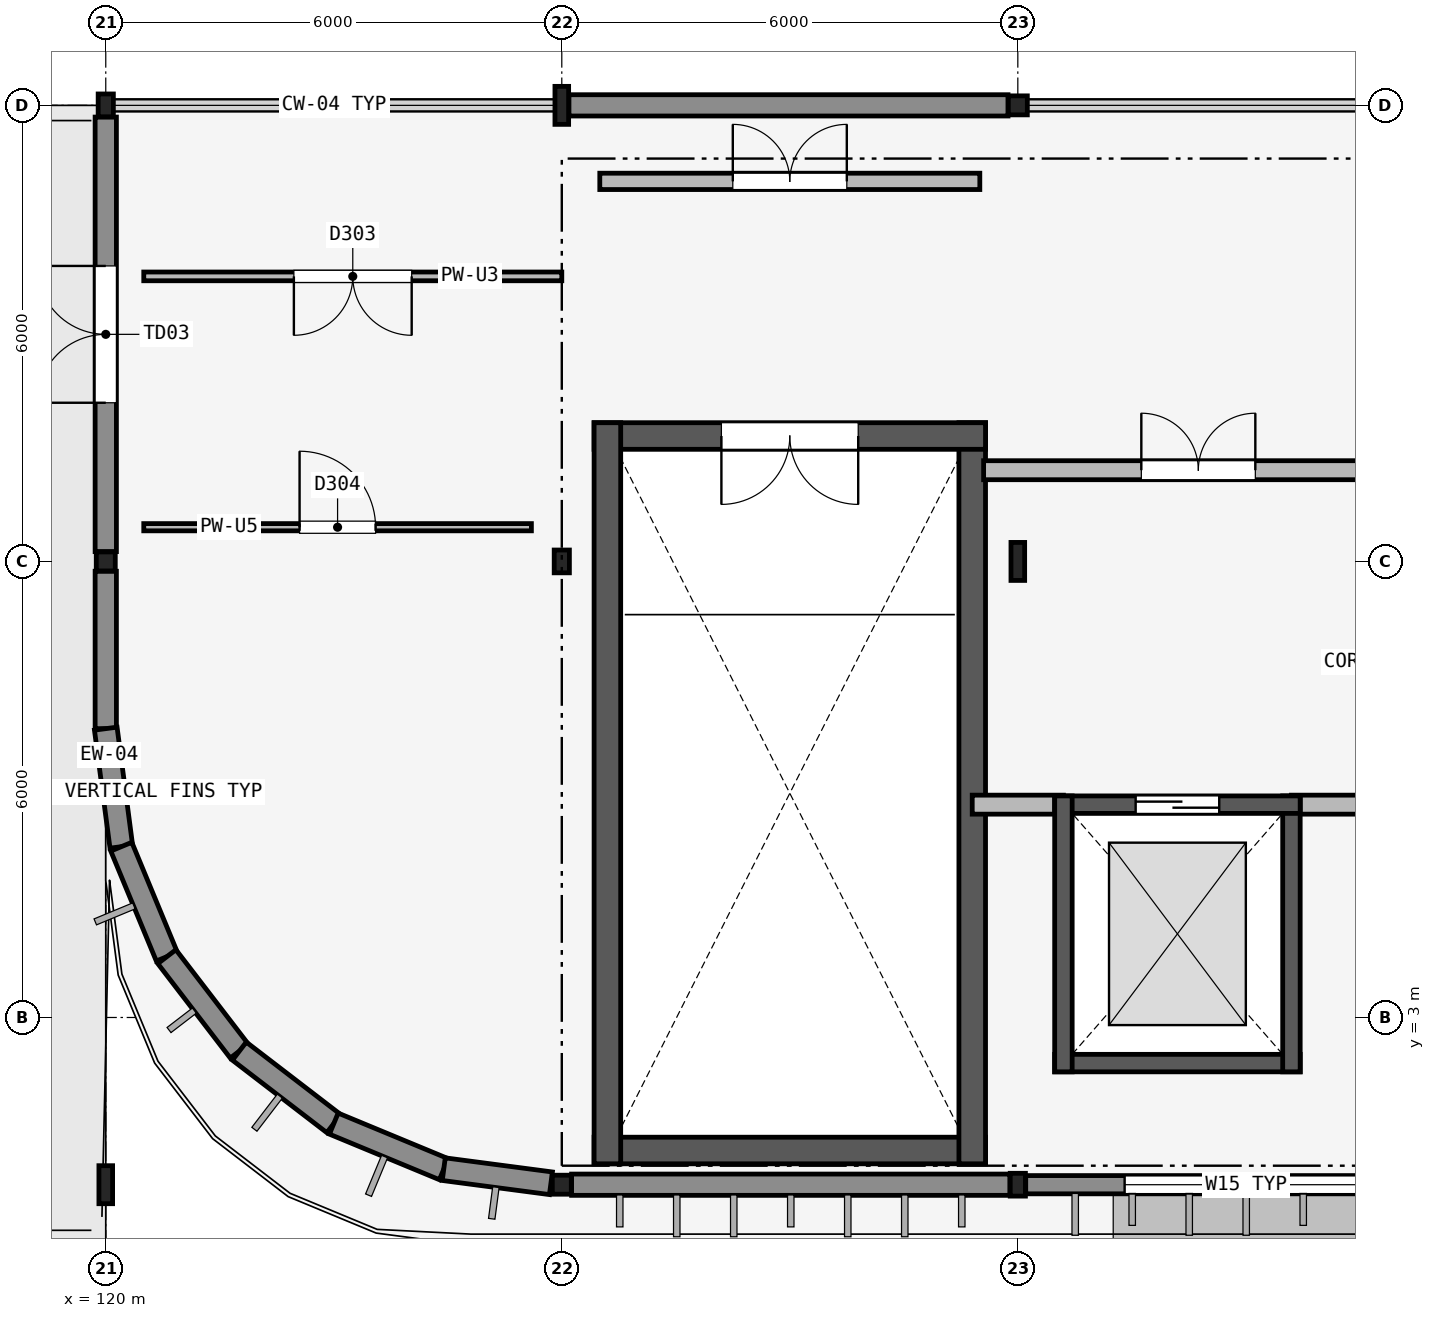
"""IFC4 building model, lengths in metres.
Left out: names, types, materials, properties, quantities, classifications, styles, units other than length and angle.
Written with IfcOpenShell. Run it as: python <this file> out.ifc"""

import sys

from ifc_helpers import new_model, si_unit, direction, frame, frame_2d, origin, origin_2d, place, context, subcontext, project, spatial, rectangle, hollow_rectangle, i_section, extrude, element, fill, save


model = new_model("IFC4")
c1 = context("Model", 3, precision=1e-05, world=origin(), true_north=direction((0.0, 1.0)))
c2 = subcontext(c1, "Body", "Model", "MODEL_VIEW")
j1 = project(units=[si_unit("LENGTHUNIT", "METRE"), si_unit("PLANEANGLEUNIT", "RADIAN")], contexts=[c1])
p1 = place(None, origin())
s1 = spatial("IfcSite", under=j1, at=p1, CompositionType="ELEMENT")
p2 = place(p1, origin())
s2 = spatial("IfcBuilding", under=s1, at=p2, CompositionType="ELEMENT")
p3 = place(p2, frame((0.0, 0.0, 30.0)))
s3 = spatial("IfcBuildingStorey", under=s2, at=p3, CompositionType="ELEMENT", Elevation=30.0)
p4 = place(p3, frame((120.0, 0.8, 0.0), z_axis=(0.0, 0.0, 1.0), x_axis=(1.0, 0.0, 0.0)))
e1 = element("IfcColumn", 1, at=p4, inside=s3, PredefinedType="COLUMN", context=c2, shape_type="SweptSolid", body=[
    extrude(i_section(OverallWidth=0.18, OverallDepth=0.5, WebThickness=0.01, FlangeThickness=0.017, FilletRadius=0.017, at=origin_2d()), origin(), (0.0, 0.0, 1.0), 4.2),
])
p5 = place(p3, frame((120.0, 9.0, 0.0), z_axis=(0.0, 0.0, 1.0), x_axis=(1.0, 0.0, 0.0)))
e2 = element("IfcColumn", 2, at=p5, inside=s3, PredefinedType="COLUMN", context=c2, shape_type="SweptSolid", body=[
    extrude(hollow_rectangle(XDim=0.25, YDim=0.25, WallThickness=0.012, InnerFilletRadius=0.012, OuterFilletRadius=0.024, at=origin_2d()), origin(), (0.0, 0.0, 1.0), 4.2),
])
p6 = place(p3, frame((120.0, 15.0, 0.0), z_axis=(0.0, 0.0, 1.0), x_axis=(1.0, 0.0, 0.0)))
e3 = element("IfcColumn", 3, at=p6, inside=s3, PredefinedType="COLUMN", context=c2, shape_type="SweptSolid", body=[
    extrude(hollow_rectangle(XDim=0.2, YDim=0.3, WallThickness=0.012, InnerFilletRadius=0.012, OuterFilletRadius=0.024, at=origin_2d()), origin(), (0.0, 0.0, 1.0), 4.2),
])
p7 = place(p3, frame((126.0, 0.8, 0.0), z_axis=(0.0, 0.0, 1.0), x_axis=(1.0, 0.0, 0.0)))
e4 = element("IfcColumn", 4, at=p7, inside=s3, PredefinedType="COLUMN", context=c2, shape_type="SweptSolid", body=[
    extrude(hollow_rectangle(XDim=0.25, YDim=0.25, WallThickness=0.012, InnerFilletRadius=0.012, OuterFilletRadius=0.024, at=origin_2d()), origin(), (0.0, 0.0, 1.0), 4.2),
])
p8 = place(p3, frame((126.0, 9.0, 0.0), z_axis=(0.0, 0.0, 1.0), x_axis=(1.0, 0.0, 0.0)))
e5 = element("IfcColumn", 5, at=p8, inside=s3, PredefinedType="COLUMN", context=c2, shape_type="SweptSolid", body=[
    extrude(hollow_rectangle(XDim=0.2, YDim=0.3, WallThickness=0.012, InnerFilletRadius=0.012, OuterFilletRadius=0.024, at=origin_2d()), origin(), (0.0, 0.0, 1.0), 4.2),
])
p9 = place(p3, frame((126.0, 15.0, 0.0), z_axis=(0.0, 0.0, 1.0), x_axis=(1.0, 0.0, 0.0)))
e6 = element("IfcColumn", 6, at=p9, inside=s3, PredefinedType="COLUMN", context=c2, shape_type="SweptSolid", body=[
    extrude(i_section(OverallWidth=0.18, OverallDepth=0.5, WebThickness=0.01, FlangeThickness=0.017, FilletRadius=0.017, at=origin_2d()), origin(), (0.0, 0.0, 1.0), 4.2),
])
p10 = place(p3, frame((132.0, 0.8, 0.0), z_axis=(0.0, 0.0, 1.0), x_axis=(1.0, 0.0, 0.0)))
e7 = element("IfcColumn", 7, at=p10, inside=s3, PredefinedType="COLUMN", context=c2, shape_type="SweptSolid", body=[
    extrude(hollow_rectangle(XDim=0.2, YDim=0.3, WallThickness=0.012, InnerFilletRadius=0.012, OuterFilletRadius=0.024, at=origin_2d()), origin(), (0.0, 0.0, 1.0), 4.2),
])
p11 = place(p3, frame((132.0, 9.0, 0.0), z_axis=(0.0, 0.0, 1.0), x_axis=(1.0, 0.0, 0.0)))
e8 = element("IfcColumn", 8, at=p11, inside=s3, PredefinedType="COLUMN", context=c2, shape_type="SweptSolid", body=[
    extrude(i_section(OverallWidth=0.18, OverallDepth=0.5, WebThickness=0.01, FlangeThickness=0.017, FilletRadius=0.017, at=origin_2d()), origin(), (0.0, 0.0, 1.0), 4.2),
])
p12 = place(p3, frame((132.0, 15.0, 0.0), z_axis=(0.0, 0.0, 1.0), x_axis=(1.0, 0.0, 0.0)))
e9 = element("IfcColumn", 9, at=p12, inside=s3, PredefinedType="COLUMN", context=c2, shape_type="SweptSolid", body=[
    extrude(hollow_rectangle(XDim=0.25, YDim=0.25, WallThickness=0.012, InnerFilletRadius=0.012, OuterFilletRadius=0.024, at=origin_2d()), origin(), (0.0, 0.0, 1.0), 4.2),
])
p13 = place(p3, frame((126.129, 0.8, 0.0), z_axis=(0.0, 0.0, 1.0), x_axis=(1.0, 0.0, 0.0)))
e10 = element("IfcWall", 10, at=p13, inside=s3, PredefinedType="SOLIDWALL", context=c2, shape_type="SweptSolid", body=[
    extrude(rectangle(XDim=5.767, YDim=0.28, at=frame_2d((2.884, 0.0))), origin(), (0.0, 0.0, 1.0), 3.624),
])
p14 = place(p3, frame((132.104, 0.8, 0.0), z_axis=(0.0, 0.0, 1.0), x_axis=(1.0, 0.0, 0.0)))
e11 = element("IfcWall", 11, at=p14, inside=s3, PredefinedType="SOLIDWALL", context=c2, shape_type="SweptSolid", body=[
    extrude(rectangle(XDim=5.802, YDim=0.24, at=frame_2d((2.901, 0.0))), origin(), (0.0, 0.0, 1.0), 3.624),
])
p15 = place(p14, frame((1.301, 0.0, 0.8)))
e12 = element("IfcOpeningElement", 12, at=p15, cuts=e11, PredefinedType="OPENING", context=c2, shape_type="SweptSolid", body=[
    extrude(rectangle(XDim=3.2, YDim=1.8, at=frame_2d((1.6, 0.9))), frame((0.0, 0.13, 0.0), z_axis=(0.0, -1.0, 0.0), x_axis=(1.0, 0.0, 0.0)), (0.0, 0.0, 1.0), 0.26),
])
p16 = place(p3, frame((126.094, 15.0, 0.0), z_axis=(0.0, 0.0, 1.0), x_axis=(1.0, 0.0, 0.0)))
e13 = element("IfcWall", 13, at=p16, inside=s3, PredefinedType="SOLIDWALL", context=c2, shape_type="SweptSolid", body=[
    extrude(rectangle(XDim=5.777, YDim=0.28, at=frame_2d((2.889, 0.0))), origin(), (0.0, 0.0, 1.0), 3.43),
])
p17 = place(p3, frame((120.0, 6.8, 0.0), z_axis=(0.0, 0.0, 1.0), x_axis=(0.0, 1.0, 0.0)))
e14 = element("IfcWall", 14, at=p17, inside=s3, PredefinedType="SOLIDWALL", context=c2, shape_type="SweptSolid", body=[
    extrude(rectangle(XDim=2.071, YDim=0.28, at=frame_2d((1.036, 0.0))), origin(), (0.0, 0.0, 1.0), 3.58),
])
p18 = place(p3, frame((120.0, 9.129, 0.0), z_axis=(0.0, 0.0, 1.0), x_axis=(0.0, 1.0, 0.0)))
e15 = element("IfcWall", 15, at=p18, inside=s3, PredefinedType="SOLIDWALL", context=c2, shape_type="SweptSolid", body=[
    extrude(rectangle(XDim=5.717, YDim=0.28, at=frame_2d((2.858, 0.0))), origin(), (0.0, 0.0, 1.0), 3.58),
])
p19 = place(p18, frame((1.958, 0.0, 0.0)))
e16 = element("IfcOpeningElement", 16, at=p19, cuts=e15, PredefinedType="OPENING", context=c2, shape_type="SweptSolid", body=[
    extrude(rectangle(XDim=1.8, YDim=2.3, at=frame_2d((0.9, 1.15))), frame((0.0, 0.15, 0.0), z_axis=(0.0, -1.0, 0.0), x_axis=(1.0, 0.0, 0.0)), (0.0, 0.0, 1.0), 0.3),
])
p20 = place(p3, frame((120.0, 6.8, 0.0), z_axis=(0.0, 0.0, 1.0), x_axis=(0.130458544462, -0.991453765022, 0.0)))
e17 = element("IfcWall", 17, at=p20, inside=s3, PredefinedType="SOLIDWALL", context=c2, shape_type="SweptSolid", body=[
    extrude(rectangle(XDim=1.566, YDim=0.3, at=frame_2d((0.783, 0.0))), origin(), (0.0, 0.0, 1.0), 3.624),
])
p21 = place(p3, frame((120.204, 5.247, 0.0), z_axis=(0.0, 0.0, 1.0), x_axis=(0.382677606907, -0.923881945474, 0.0)))
e18 = element("IfcWall", 18, at=p21, inside=s3, PredefinedType="SOLIDWALL", context=c2, shape_type="SweptSolid", body=[
    extrude(rectangle(XDim=1.566, YDim=0.3, at=frame_2d((0.783, 0.0))), origin(), (0.0, 0.0, 1.0), 3.624),
])
for number, where, z_axis, x_axis in (
    (19, (120.804, 3.8, 0.0), (0.0, 0.0, 1.0), (0.609, -0.793, 0.0)),
    (20, (121.757, 2.557, 0.0), (0.0, 0.0, 1.0), (0.793, -0.609, 0.0)),
):
    element("IfcWall", number, at=place(p3, frame(where, z_axis=z_axis, x_axis=x_axis)), inside=s3, PredefinedType="SOLIDWALL", context=c2, shape_type="SweptSolid", body=[
        extrude(rectangle(XDim=1.566, YDim=0.3, at=frame_2d((0.783, 0.0))), origin(), (0.0, 0.0, 1.0), 4.035),
    ])
p22 = place(p3, frame((123.0, 1.604, 0.0), z_axis=(0.0, 0.0, 1.0), x_axis=(0.923881945474, -0.382677606907, 0.0)))
e21 = element("IfcWall", 21, at=p22, inside=s3, PredefinedType="SOLIDWALL", context=c2, shape_type="SweptSolid", body=[
    extrude(rectangle(XDim=1.566, YDim=0.3, at=frame_2d((0.783, 0.0))), origin(), (0.0, 0.0, 1.0), 3.73),
])
p23 = place(p3, frame((124.447, 1.004, 0.0), z_axis=(0.0, 0.0, 1.0), x_axis=(0.99145137358, -0.130476717562, 0.0)))
e22 = element("IfcWall", 22, at=p23, inside=s3, PredefinedType="SOLIDWALL", context=c2, shape_type="SweptSolid", body=[
    extrude(rectangle(XDim=1.422, YDim=0.3, at=frame_2d((0.711, 0.0))), origin(), (0.0, 0.0, 1.0), 3.624),
])
p24 = place(p3, frame((126.425, 1.25, 0.0), z_axis=(0.0, 0.0, 1.0), x_axis=(1.0, 0.0, 0.0)))
e23 = element("IfcWall", 23, at=p24, inside=s3, PredefinedType="SHEAR", context=c2, shape_type="SweptSolid", body=[
    extrude(rectangle(XDim=5.15, YDim=0.35, at=frame_2d((2.575, 0.0))), origin(), (0.0, 0.0, 1.0), 4.06),
])
p25 = place(p3, frame((131.4, 1.075, 0.0), z_axis=(0.0, 0.0, 1.0), x_axis=(0.0, 1.0, 0.0)))
e24 = element("IfcWall", 24, at=p25, inside=s3, PredefinedType="SHEAR", context=c2, shape_type="SweptSolid", body=[
    extrude(rectangle(XDim=9.75, YDim=0.35, at=frame_2d((4.875, 0.0))), origin(), (0.0, 0.0, 1.0), 4.06),
])
p26 = place(p3, frame((131.575, 10.65, 0.0), z_axis=(0.0, 0.0, 1.0), x_axis=(-1.0, 0.0, 0.0)))
e25 = element("IfcWall", 25, at=p26, inside=s3, PredefinedType="SHEAR", context=c2, shape_type="SweptSolid", body=[
    extrude(rectangle(XDim=5.15, YDim=0.35, at=frame_2d((2.575, 0.0))), origin(), (0.0, 0.0, 1.0), 4.06),
])
p27 = place(p26, frame((1.675, 0.0, 0.0)))
e26 = element("IfcOpeningElement", 26, at=p27, cuts=e25, PredefinedType="OPENING", context=c2, shape_type="SweptSolid", body=[
    extrude(rectangle(XDim=1.8, YDim=2.2, at=frame_2d((0.9, 1.1))), frame((0.0, 0.185, 0.0), z_axis=(0.0, -1.0, 0.0), x_axis=(1.0, 0.0, 0.0)), (0.0, 0.0, 1.0), 0.37),
])
p28 = place(p3, frame((126.6, 10.825, 0.0), z_axis=(0.0, 0.0, 1.0), x_axis=(0.0, -1.0, 0.0)))
e27 = element("IfcWall", 27, at=p28, inside=s3, PredefinedType="SHEAR", context=c2, shape_type="SweptSolid", body=[
    extrude(rectangle(XDim=9.75, YDim=0.35, at=frame_2d((4.875, 0.0))), origin(), (0.0, 0.0, 1.0), 4.06),
])
p29 = place(p3, frame((126.5, 14.0, 0.0), z_axis=(0.0, 0.0, 1.0), x_axis=(1.0, 0.0, 0.0)))
e28 = element("IfcWall", 28, at=p29, inside=s3, PredefinedType="PARTITIONING", context=c2, shape_type="SweptSolid", body=[
    extrude(rectangle(XDim=5.0, YDim=0.215, at=frame_2d((2.5, 0.0))), origin(), (0.0, 0.0, 1.0), 4.03),
])
p30 = place(p29, frame((1.75, 0.0, 0.0)))
e29 = element("IfcOpeningElement", 29, at=p30, cuts=e28, PredefinedType="OPENING", context=c2, shape_type="SweptSolid", body=[
    extrude(rectangle(XDim=1.5, YDim=2.15, at=frame_2d((0.75, 1.075))), frame((0.0, 0.117, 0.0), z_axis=(0.0, -1.0, 0.0), x_axis=(1.0, 0.0, 0.0)), (0.0, 0.0, 1.0), 0.235),
])
p31 = place(p3, frame((131.55, 10.2, 0.0), z_axis=(0.0, 0.0, 1.0), x_axis=(1.0, 0.0, 0.0)))
e30 = element("IfcWall", 30, at=p31, inside=s3, PredefinedType="PARTITIONING", context=c2, shape_type="SweptSolid", body=[
    extrude(rectangle(XDim=5.65, YDim=0.25, at=frame_2d((2.825, 0.0))), origin(), (0.0, 0.0, 1.0), 3.68),
])
p32 = place(p31, frame((2.075, 0.0, 0.0)))
e31 = element("IfcOpeningElement", 31, at=p32, cuts=e30, PredefinedType="OPENING", context=c2, shape_type="SweptSolid", body=[
    extrude(rectangle(XDim=1.5, YDim=2.15, at=frame_2d((0.75, 1.075))), frame((0.0, 0.135, 0.0), z_axis=(0.0, -1.0, 0.0), x_axis=(1.0, 0.0, 0.0)), (0.0, 0.0, 1.0), 0.27),
])
p33 = place(p3, frame((135.6, 5.8, 0.0), z_axis=(0.0, 0.0, 1.0), x_axis=(1.0, 0.0, 0.0)))
e32 = element("IfcWall", 32, at=p33, inside=s3, PredefinedType="PARTITIONING", context=c2, shape_type="SweptSolid", body=[
    extrude(rectangle(XDim=1.6, YDim=0.25, at=frame_2d((0.8, 0.0))), origin(), (0.0, 0.0, 1.0), 4.03),
])
p34 = place(p3, frame((131.4, 5.8, 0.0), z_axis=(0.0, 0.0, 1.0), x_axis=(1.0, 0.0, 0.0)))
e33 = element("IfcWall", 33, at=p34, inside=s3, PredefinedType="PARTITIONING", context=c2, shape_type="SweptSolid", body=[
    extrude(rectangle(XDim=1.2, YDim=0.25, at=frame_2d((0.6, 0.0))), origin(), (0.0, 0.0, 1.0), 3.624),
])
p35 = place(p3, frame((132.485, 2.4, 0.0), z_axis=(0.0, 0.0, 1.0), x_axis=(1.0, 0.0, 0.0)))
e34 = element("IfcWall", 34, at=p35, inside=s3, PredefinedType="SHEAR", context=c2, shape_type="SweptSolid", body=[
    extrude(rectangle(XDim=3.23, YDim=0.23, at=frame_2d((1.615, 0.0))), origin(), (0.0, 0.0, 1.0), 4.2),
])
p36 = place(p3, frame((135.6, 2.285, 0.0), z_axis=(0.0, 0.0, 1.0), x_axis=(0.0, 1.0, 0.0)))
e35 = element("IfcWall", 35, at=p36, inside=s3, PredefinedType="SHEAR", context=c2, shape_type="SweptSolid", body=[
    extrude(rectangle(XDim=3.63, YDim=0.23, at=frame_2d((1.815, 0.0))), origin(), (0.0, 0.0, 1.0), 4.2),
])
p37 = place(p3, frame((135.715, 5.8, 0.0), z_axis=(0.0, 0.0, 1.0), x_axis=(-1.0, 0.0, 0.0)))
e36 = element("IfcWall", 36, at=p37, inside=s3, PredefinedType="SHEAR", context=c2, shape_type="SweptSolid", body=[
    extrude(rectangle(XDim=3.23, YDim=0.23, at=frame_2d((1.615, 0.0))), origin(), (0.0, 0.0, 1.0), 4.2),
])
p38 = place(p37, frame((1.065, 0.0, 0.0)))
e37 = element("IfcOpeningElement", 37, at=p38, cuts=e36, PredefinedType="OPENING", context=c2, shape_type="SweptSolid", body=[
    extrude(rectangle(XDim=1.1, YDim=2.2, at=frame_2d((0.55, 1.1))), frame((0.0, 0.125, 0.0), z_axis=(0.0, -1.0, 0.0), x_axis=(1.0, 0.0, 0.0)), (0.0, 0.0, 1.0), 0.25),
])
p39 = place(p3, frame((132.6, 5.915, 0.0), z_axis=(0.0, 0.0, 1.0), x_axis=(0.0, -1.0, 0.0)))
e38 = element("IfcWall", 38, at=p39, inside=s3, PredefinedType="SHEAR", context=c2, shape_type="SweptSolid", body=[
    extrude(rectangle(XDim=3.63, YDim=0.23, at=frame_2d((1.815, 0.0))), origin(), (0.0, 0.0, 1.0), 4.2),
])
p40 = place(p3, frame((126.0, 12.75, 0.0), z_axis=(0.0, 0.0, 1.0), x_axis=(-1.0, 0.0, 0.0)))
e39 = element("IfcWall", 39, at=p40, inside=s3, PredefinedType="PARTITIONING", context=c2, shape_type="SweptSolid", body=[
    extrude(rectangle(XDim=5.5, YDim=0.115, at=frame_2d((2.75, 0.0))), origin(), (0.0, 0.0, 1.0), 3.706),
])
p41 = place(p40, frame((1.975, 0.0, 0.0)))
e40 = element("IfcOpeningElement", 40, at=p41, cuts=e39, PredefinedType="OPENING", context=c2, shape_type="SweptSolid", body=[
    extrude(rectangle(XDim=1.55, YDim=2.2, at=frame_2d((0.775, 1.1))), frame((0.0, 0.067, 0.0), z_axis=(0.0, -1.0, 0.0), x_axis=(1.0, 0.0, 0.0)), (0.0, 0.0, 1.0), 0.135),
])
p42 = place(p3, frame((120.5, 9.45, 0.0), z_axis=(0.0, 0.0, 1.0), x_axis=(1.0, 0.0, 0.0)))
e41 = element("IfcWall", 41, at=p42, inside=s3, PredefinedType="PARTITIONING", context=c2, shape_type="SweptSolid", body=[
    extrude(rectangle(XDim=5.1, YDim=0.095, at=frame_2d((2.55, 0.0))), origin(), (0.0, 0.0, 1.0), 3.73),
])
p43 = place(p42, frame((2.05, 0.0, 0.0)))
e42 = element("IfcOpeningElement", 42, at=p43, cuts=e41, PredefinedType="OPENING", context=c2, shape_type="SweptSolid", body=[
    extrude(rectangle(XDim=1.0, YDim=2.15, at=frame_2d((0.5, 1.075))), frame((0.0, 0.057, 0.0), z_axis=(0.0, -1.0, 0.0), x_axis=(1.0, 0.0, 0.0)), (0.0, 0.0, 1.0), 0.115),
])
p44 = place(p15, origin())
e43 = element("IfcWindow", 43, at=p44, inside=s3, PartitioningType="SINGLE_PANEL", PredefinedType="WINDOW", context=c2, shape_type="SweptSolid", body=[
    extrude(rectangle(XDim=3.2, YDim=1.8, at=frame_2d((1.6, 0.9))), frame((0.0, 0.03, 0.0), z_axis=(0.0, -1.0, 0.0), x_axis=(1.0, 0.0, 0.0)), (0.0, 0.0, 1.0), 0.06),
])
fill(e12, e43)
p45 = place(p19, origin())
e44 = element("IfcDoor", 44, at=p45, inside=s3, OperationType="DOUBLE_DOOR_SINGLE_SWING", PredefinedType="DOOR", context=c2, shape_type="SweptSolid", body=[
    extrude(rectangle(XDim=1.8, YDim=2.3, at=frame_2d((0.9, 1.15))), frame((0.0, 0.025, 0.0), z_axis=(0.0, -1.0, 0.0), x_axis=(1.0, 0.0, 0.0)), (0.0, 0.0, 1.0), 0.05),
])
fill(e16, e44)
p46 = place(p27, origin())
e45 = element("IfcDoor", 45, at=p46, inside=s3, OperationType="DOUBLE_DOOR_SINGLE_SWING", PredefinedType="DOOR", context=c2, shape_type="SweptSolid", body=[
    extrude(rectangle(XDim=1.8, YDim=2.2, at=frame_2d((0.9, 1.1))), frame((0.0, 0.025, 0.0), z_axis=(0.0, -1.0, 0.0), x_axis=(1.0, 0.0, 0.0)), (0.0, 0.0, 1.0), 0.05),
])
fill(e26, e45)
p47 = place(p30, origin())
e46 = element("IfcDoor", 46, at=p47, inside=s3, OperationType="DOUBLE_DOOR_SINGLE_SWING", PredefinedType="DOOR", context=c2, shape_type="SweptSolid", body=[
    extrude(rectangle(XDim=1.5, YDim=2.15, at=frame_2d((0.75, 1.075))), frame((0.0, 0.025, 0.0), z_axis=(0.0, -1.0, 0.0), x_axis=(1.0, 0.0, 0.0)), (0.0, 0.0, 1.0), 0.05),
])
fill(e29, e46)
p48 = place(p32, origin())
e47 = element("IfcDoor", 47, at=p48, inside=s3, OperationType="DOUBLE_DOOR_SINGLE_SWING", PredefinedType="DOOR", context=c2, shape_type="SweptSolid", body=[
    extrude(rectangle(XDim=1.5, YDim=2.15, at=frame_2d((0.75, 1.075))), frame((0.0, 0.025, 0.0), z_axis=(0.0, -1.0, 0.0), x_axis=(1.0, 0.0, 0.0)), (0.0, 0.0, 1.0), 0.05),
])
fill(e31, e47)
p49 = place(p38, origin())
e48 = element("IfcDoor", 48, at=p49, inside=s3, OperationType="SLIDING_TO_LEFT", PredefinedType="DOOR", context=c2, shape_type="SweptSolid", body=[
    extrude(rectangle(XDim=1.1, YDim=2.2, at=frame_2d((0.55, 1.1))), frame((0.0, 0.025, 0.0), z_axis=(0.0, -1.0, 0.0), x_axis=(1.0, 0.0, 0.0)), (0.0, 0.0, 1.0), 0.05),
])
fill(e37, e48)
p50 = place(p41, origin())
e49 = element("IfcDoor", 49, at=p50, inside=s3, OperationType="DOUBLE_DOOR_SINGLE_SWING", PredefinedType="DOOR", context=c2, shape_type="SweptSolid", body=[
    extrude(rectangle(XDim=1.55, YDim=2.2, at=frame_2d((0.775, 1.1))), frame((0.0, 0.025, 0.0), z_axis=(0.0, -1.0, 0.0), x_axis=(1.0, 0.0, 0.0)), (0.0, 0.0, 1.0), 0.05),
])
fill(e40, e49)
p51 = place(p43, origin())
e50 = element("IfcDoor", 50, at=p51, inside=s3, OperationType="SINGLE_SWING_LEFT", PredefinedType="DOOR", context=c2, shape_type="SweptSolid", body=[
    extrude(rectangle(XDim=1.0, YDim=2.15, at=frame_2d((0.5, 1.075))), frame((0.0, 0.025, 0.0), z_axis=(0.0, -1.0, 0.0), x_axis=(1.0, 0.0, 0.0)), (0.0, 0.0, 1.0), 0.05),
])
fill(e42, e50)
save(model, sys.argv[1])
